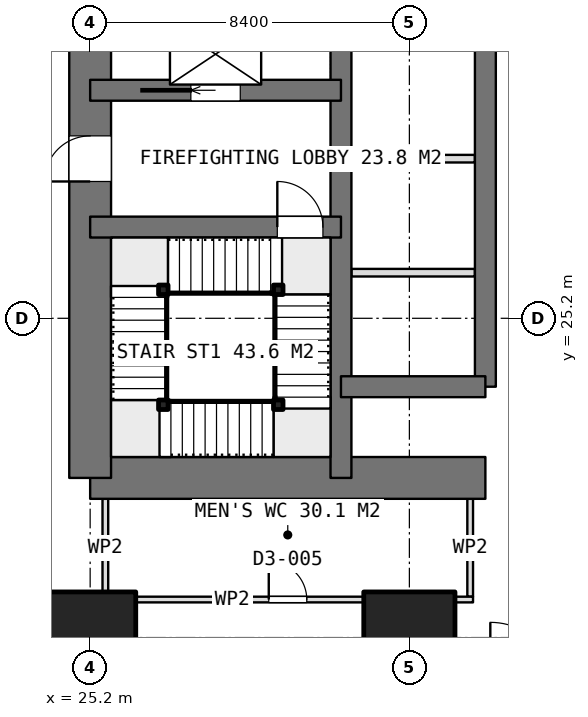
"""IFC4 building model, lengths in metres.
Left out: names, types, materials, properties, quantities, classifications, styles, units other than length and angle.
Written with IfcOpenShell. Run it as: python <this file> out.ifc"""

import sys

from ifc_helpers import new_model, si_unit, direction, frame, frame_2d, origin, origin_2d, place, context, subcontext, project, spatial, rectangle, extrude, element, fill, save


model = new_model("IFC4")
c1 = context("Model", 3, precision=1e-05, world=origin(), true_north=direction((0.0, 1.0)))
c2 = subcontext(c1, "Body", "Model", "MODEL_VIEW")
j1 = project(units=[si_unit("LENGTHUNIT", "METRE"), si_unit("PLANEANGLEUNIT", "RADIAN")], contexts=[c1])
p1 = place(None, origin())
s1 = spatial("IfcSite", under=j1, at=p1, CompositionType="ELEMENT")
p2 = place(p1, origin())
s2 = spatial("IfcBuilding", under=s1, at=p2, CompositionType="ELEMENT")
p3 = place(p2, frame((0.0, 0.0, -5.4)))
s3 = spatial("IfcBuildingStorey", under=s2, at=p3, CompositionType="ELEMENT", Elevation=-5.4)
p4 = place(p3, frame((25.2, 21.0, 0.0), z_axis=(0.0, 0.0, 1.0), x_axis=(1.0, 0.0, 0.0)))
e1 = element("IfcWall", 1, at=p4, inside=s3, PredefinedType="SHEAR", context=c2, shape_type="SweptSolid", body=[
    extrude(rectangle(XDim=10.4, YDim=1.1, at=frame_2d((5.2, 0.0))), origin(), (0.0, 0.0, 1.0), 5.4),
])
p5 = place(p3, frame((25.2, 21.0, 0.0), z_axis=(0.0, 0.0, 1.0), x_axis=(0.0, 1.0, 0.0)))
e2 = element("IfcWall", 2, at=p5, inside=s3, PredefinedType="SHEAR", context=c2, shape_type="SweptSolid", body=[
    extrude(rectangle(XDim=25.2, YDim=1.1, at=frame_2d((12.6, 0.0))), origin(), (0.0, 0.0, 1.0), 5.4),
])
p6 = place(p5, frame((7.8, 0.0, 0.0)))
e3 = element("IfcOpeningElement", 3, at=p6, cuts=e2, PredefinedType="OPENING", context=c2, shape_type="SweptSolid", body=[
    extrude(rectangle(XDim=1.2, YDim=2.1, at=frame_2d((0.6, 1.05))), frame((0.0, 0.56, 0.0), z_axis=(0.0, -1.0, 0.0), x_axis=(1.0, 0.0, 0.0)), (0.0, 0.0, 1.0), 1.12),
])
p7 = place(p5, frame((14.25, 0.0, 0.0)))
e4 = element("IfcOpeningElement", 4, at=p7, cuts=e2, PredefinedType="OPENING", context=c2, shape_type="SweptSolid", body=[
    extrude(rectangle(XDim=0.9, YDim=2.1, at=frame_2d((0.45, 1.05))), frame((0.0, 0.56, 0.0), z_axis=(0.0, -1.0, 0.0), x_axis=(1.0, 0.0, 0.0)), (0.0, 0.0, 1.0), 1.12),
])
p8 = place(p5, frame((16.85, 0.0, 0.0)))
e5 = element("IfcOpeningElement", 5, at=p8, cuts=e2, PredefinedType="OPENING", context=c2, shape_type="SweptSolid", body=[
    extrude(rectangle(XDim=0.9, YDim=2.1, at=frame_2d((0.45, 1.05))), frame((0.0, 0.56, 0.0), z_axis=(0.0, -1.0, 0.0), x_axis=(1.0, 0.0, 0.0)), (0.0, 0.0, 1.0), 1.12),
])
p9 = place(p5, frame((19.075, 0.0, 0.0)))
e6 = element("IfcOpeningElement", 6, at=p9, cuts=e2, PredefinedType="OPENING", context=c2, shape_type="SweptSolid", body=[
    extrude(rectangle(XDim=1.2, YDim=2.1, at=frame_2d((0.6, 1.05))), frame((0.0, 0.56, 0.0), z_axis=(0.0, -1.0, 0.0), x_axis=(1.0, 0.0, 0.0)), (0.0, 0.0, 1.0), 1.12),
])
p10 = place(p3, frame((31.8, 21.0, 0.0), z_axis=(0.0, 0.0, 1.0), x_axis=(0.0, 1.0, 0.0)))
e7 = element("IfcWall", 7, at=p10, inside=s3, PredefinedType="SHEAR", context=c2, shape_type="SweptSolid", body=[
    extrude(rectangle(XDim=25.2, YDim=0.55, at=frame_2d((12.6, 0.0))), origin(), (0.0, 0.0, 1.0), 5.4),
])
p11 = place(p3, frame((35.6, 23.4, 0.0), z_axis=(0.0, 0.0, 1.0), x_axis=(0.0, 1.0, 0.0)))
e8 = element("IfcWall", 8, at=p11, inside=s3, PredefinedType="SHEAR", context=c2, shape_type="SweptSolid", body=[
    extrude(rectangle(XDim=18.0, YDim=0.55, at=frame_2d((9.0, 0.0))), origin(), (0.0, 0.0, 1.0), 5.4),
])
p12 = place(p3, frame((31.8, 23.4, 0.0), z_axis=(0.0, 0.0, 1.0), x_axis=(1.0, 0.0, 0.0)))
e9 = element("IfcWall", 9, at=p12, inside=s3, PredefinedType="SHEAR", context=c2, shape_type="SweptSolid", body=[
    extrude(rectangle(XDim=3.8, YDim=0.55, at=frame_2d((1.9, 0.0))), origin(), (0.0, 0.0, 1.0), 5.4),
])
p13 = place(p3, frame((25.2, 27.6, 0.0), z_axis=(0.0, 0.0, 1.0), x_axis=(1.0, 0.0, 0.0)))
e10 = element("IfcWall", 10, at=p13, inside=s3, PredefinedType="SHEAR", context=c2, shape_type="SweptSolid", body=[
    extrude(rectangle(XDim=6.6, YDim=0.55, at=frame_2d((3.3, 0.0))), origin(), (0.0, 0.0, 1.0), 5.4),
])
p14 = place(p13, frame((4.925, 0.0, 0.0)))
e11 = element("IfcOpeningElement", 11, at=p14, cuts=e10, PredefinedType="OPENING", context=c2, shape_type="SweptSolid", body=[
    extrude(rectangle(XDim=1.2, YDim=2.1, at=frame_2d((0.6, 1.05))), frame((0.0, 0.285, 0.0), z_axis=(0.0, -1.0, 0.0), x_axis=(1.0, 0.0, 0.0)), (0.0, 0.0, 1.0), 0.57),
])
p15 = place(p3, frame((25.2, 31.2, 0.0), z_axis=(0.0, 0.0, 1.0), x_axis=(1.0, 0.0, 0.0)))
e12 = element("IfcWall", 12, at=p15, inside=s3, PredefinedType="SHEAR", context=c2, shape_type="SweptSolid", body=[
    extrude(rectangle(XDim=6.6, YDim=0.55, at=frame_2d((3.3, 0.0))), origin(), (0.0, 0.0, 1.0), 5.4),
])
p16 = place(p15, frame((2.65, 0.0, 0.0)))
e13 = element("IfcOpeningElement", 13, at=p16, cuts=e12, PredefinedType="OPENING", context=c2, shape_type="SweptSolid", body=[
    extrude(rectangle(XDim=1.3, YDim=2.1, at=frame_2d((0.65, 1.05))), frame((0.0, 0.285, 0.0), z_axis=(0.0, -1.0, 0.0), x_axis=(1.0, 0.0, 0.0)), (0.0, 0.0, 1.0), 0.57),
])
for number, where, z_axis, x_axis in (
    (14, (25.2, 16.8, 0.0), (0.0, 0.0, 1.0), (1.0, 0.0, 0.0)),
    (15, (33.6, 16.8, 0.0), (0.0, 0.0, 1.0), (1.0, 0.0, 0.0)),
):
    element("IfcColumn", number, at=place(p3, frame(where, z_axis=z_axis, x_axis=x_axis)), inside=s3, PredefinedType="COLUMN", context=c2, shape_type="SweptSolid", body=[
        extrude(rectangle(XDim=2.4, YDim=2.4, at=origin_2d()), origin(), (0.0, 0.0, 1.0), 5.4),
    ])
for number, where, z_axis, x_axis in (
    (16, (32.075, 26.4, 0.0), (0.0, 0.0, 1.0), (1.0, 0.0, 0.0)),
    (17, (32.075, 29.4, 0.0), (0.0, 0.0, 1.0), (1.0, 0.0, 0.0)),
):
    element("IfcWall", number, at=place(p3, frame(where, z_axis=z_axis, x_axis=x_axis)), inside=s3, PredefinedType="PARTITIONING", context=c2, shape_type="SweptSolid", body=[
        extrude(rectangle(XDim=3.25, YDim=0.2, at=frame_2d((1.625, 0.0))), origin(), (0.0, 0.0, 1.0), 5.1),
    ])
p17 = place(p3, frame((25.525, 17.8, 0.0), z_axis=(0.0, 0.0, 1.0), x_axis=(1.0, 0.0, 0.0)))
e18 = element("IfcWall", 18, at=p17, inside=s3, PredefinedType="PARTITIONING", context=c2, shape_type="SweptSolid", body=[
    extrude(rectangle(XDim=9.75, YDim=0.15, at=frame_2d((4.875, 0.0))), origin(), (0.0, 0.0, 1.0), 5.1),
])
p18 = place(p17, frame((4.375, 0.0, 0.0)))
e19 = element("IfcOpeningElement", 19, at=p18, cuts=e18, PredefinedType="OPENING", context=c2, shape_type="SweptSolid", body=[
    extrude(rectangle(XDim=1.0, YDim=2.1, at=frame_2d((0.5, 1.05))), frame((0.0, 0.085, 0.0), z_axis=(0.0, -1.0, 0.0), x_axis=(1.0, 0.0, 0.0)), (0.0, 0.0, 1.0), 0.17),
])
for number, where, z_axis, x_axis in (
    (20, (25.6, 17.875, 0.0), (0.0, 0.0, 1.0), (0.0, 1.0, 0.0)),
    (21, (35.2, 17.875, 0.0), (0.0, 0.0, 1.0), (0.0, 1.0, 0.0)),
):
    element("IfcWall", number, at=place(p3, frame(where, z_axis=z_axis, x_axis=x_axis)), inside=s3, PredefinedType="PARTITIONING", context=c2, shape_type="SweptSolid", body=[
        extrude(rectangle(XDim=2.575, YDim=0.15, at=frame_2d((1.288, 0.0))), origin(), (0.0, 0.0, 1.0), 5.1),
    ])
for number, where, z_axis, x_axis in (
    (22, (30.15, 25.95, 0.0), (0.0, 0.0, 1.0), (1.0, 0.0, 0.0)),
    (23, (30.15, 22.925, 0.0), (0.0, 0.0, 1.0), (1.0, 0.0, 0.0)),
    (24, (27.125, 22.925, 0.0), (0.0, 0.0, 1.0), (1.0, 0.0, 0.0)),
    (25, (27.125, 25.95, 0.0), (0.0, 0.0, 1.0), (1.0, 0.0, 0.0)),
):
    element("IfcColumn", number, at=place(p3, frame(where, z_axis=z_axis, x_axis=x_axis)), inside=s3, PredefinedType="COLUMN", context=c2, shape_type="SweptSolid", body=[
        extrude(rectangle(XDim=0.25, YDim=0.25, at=origin_2d()), origin(), (0.0, 0.0, 1.0), 5.4),
    ])
p19 = place(p6, origin())
e26 = element("IfcDoor", 26, at=p19, inside=s3, OperationType="SINGLE_SWING_LEFT", PredefinedType="DOOR", context=c2, shape_type="SweptSolid", body=[
    extrude(rectangle(XDim=1.2, YDim=2.1, at=frame_2d((0.6, 1.05))), frame((0.0, 0.025, 0.0), z_axis=(0.0, -1.0, 0.0), x_axis=(1.0, 0.0, 0.0)), (0.0, 0.0, 1.0), 0.05),
])
fill(e3, e26)
p20 = place(p16, origin())
e27 = element("IfcDoor", 27, at=p20, inside=s3, OperationType="SLIDING_TO_LEFT", PredefinedType="USERDEFINED", context=c2, shape_type="SweptSolid", body=[
    extrude(rectangle(XDim=1.3, YDim=2.1, at=frame_2d((0.65, 1.05))), frame((0.0, 0.025, 0.0), z_axis=(0.0, -1.0, 0.0), x_axis=(1.0, 0.0, 0.0)), (0.0, 0.0, 1.0), 0.05),
])
fill(e13, e27)
p21 = place(p18, origin())
e28 = element("IfcDoor", 28, at=p21, inside=s3, OperationType="SINGLE_SWING_LEFT", PredefinedType="DOOR", context=c2, shape_type="SweptSolid", body=[
    extrude(rectangle(XDim=1.0, YDim=2.1, at=frame_2d((0.5, 1.05))), frame((0.0, 0.025, 0.0), z_axis=(0.0, -1.0, 0.0), x_axis=(1.0, 0.0, 0.0)), (0.0, 0.0, 1.0), 0.05),
])
fill(e19, e28)
p22 = place(p14, origin())
e29 = element("IfcDoor", 29, at=p22, inside=s3, OperationType="SINGLE_SWING_RIGHT", PredefinedType="DOOR", context=c2, shape_type="SweptSolid", body=[
    extrude(rectangle(XDim=1.2, YDim=2.1, at=frame_2d((0.6, 1.05))), frame((0.0, 0.025, 0.0), z_axis=(0.0, -1.0, 0.0), x_axis=(1.0, 0.0, 0.0)), (0.0, 0.0, 1.0), 0.05),
])
fill(e11, e29)
save(model, sys.argv[1])
